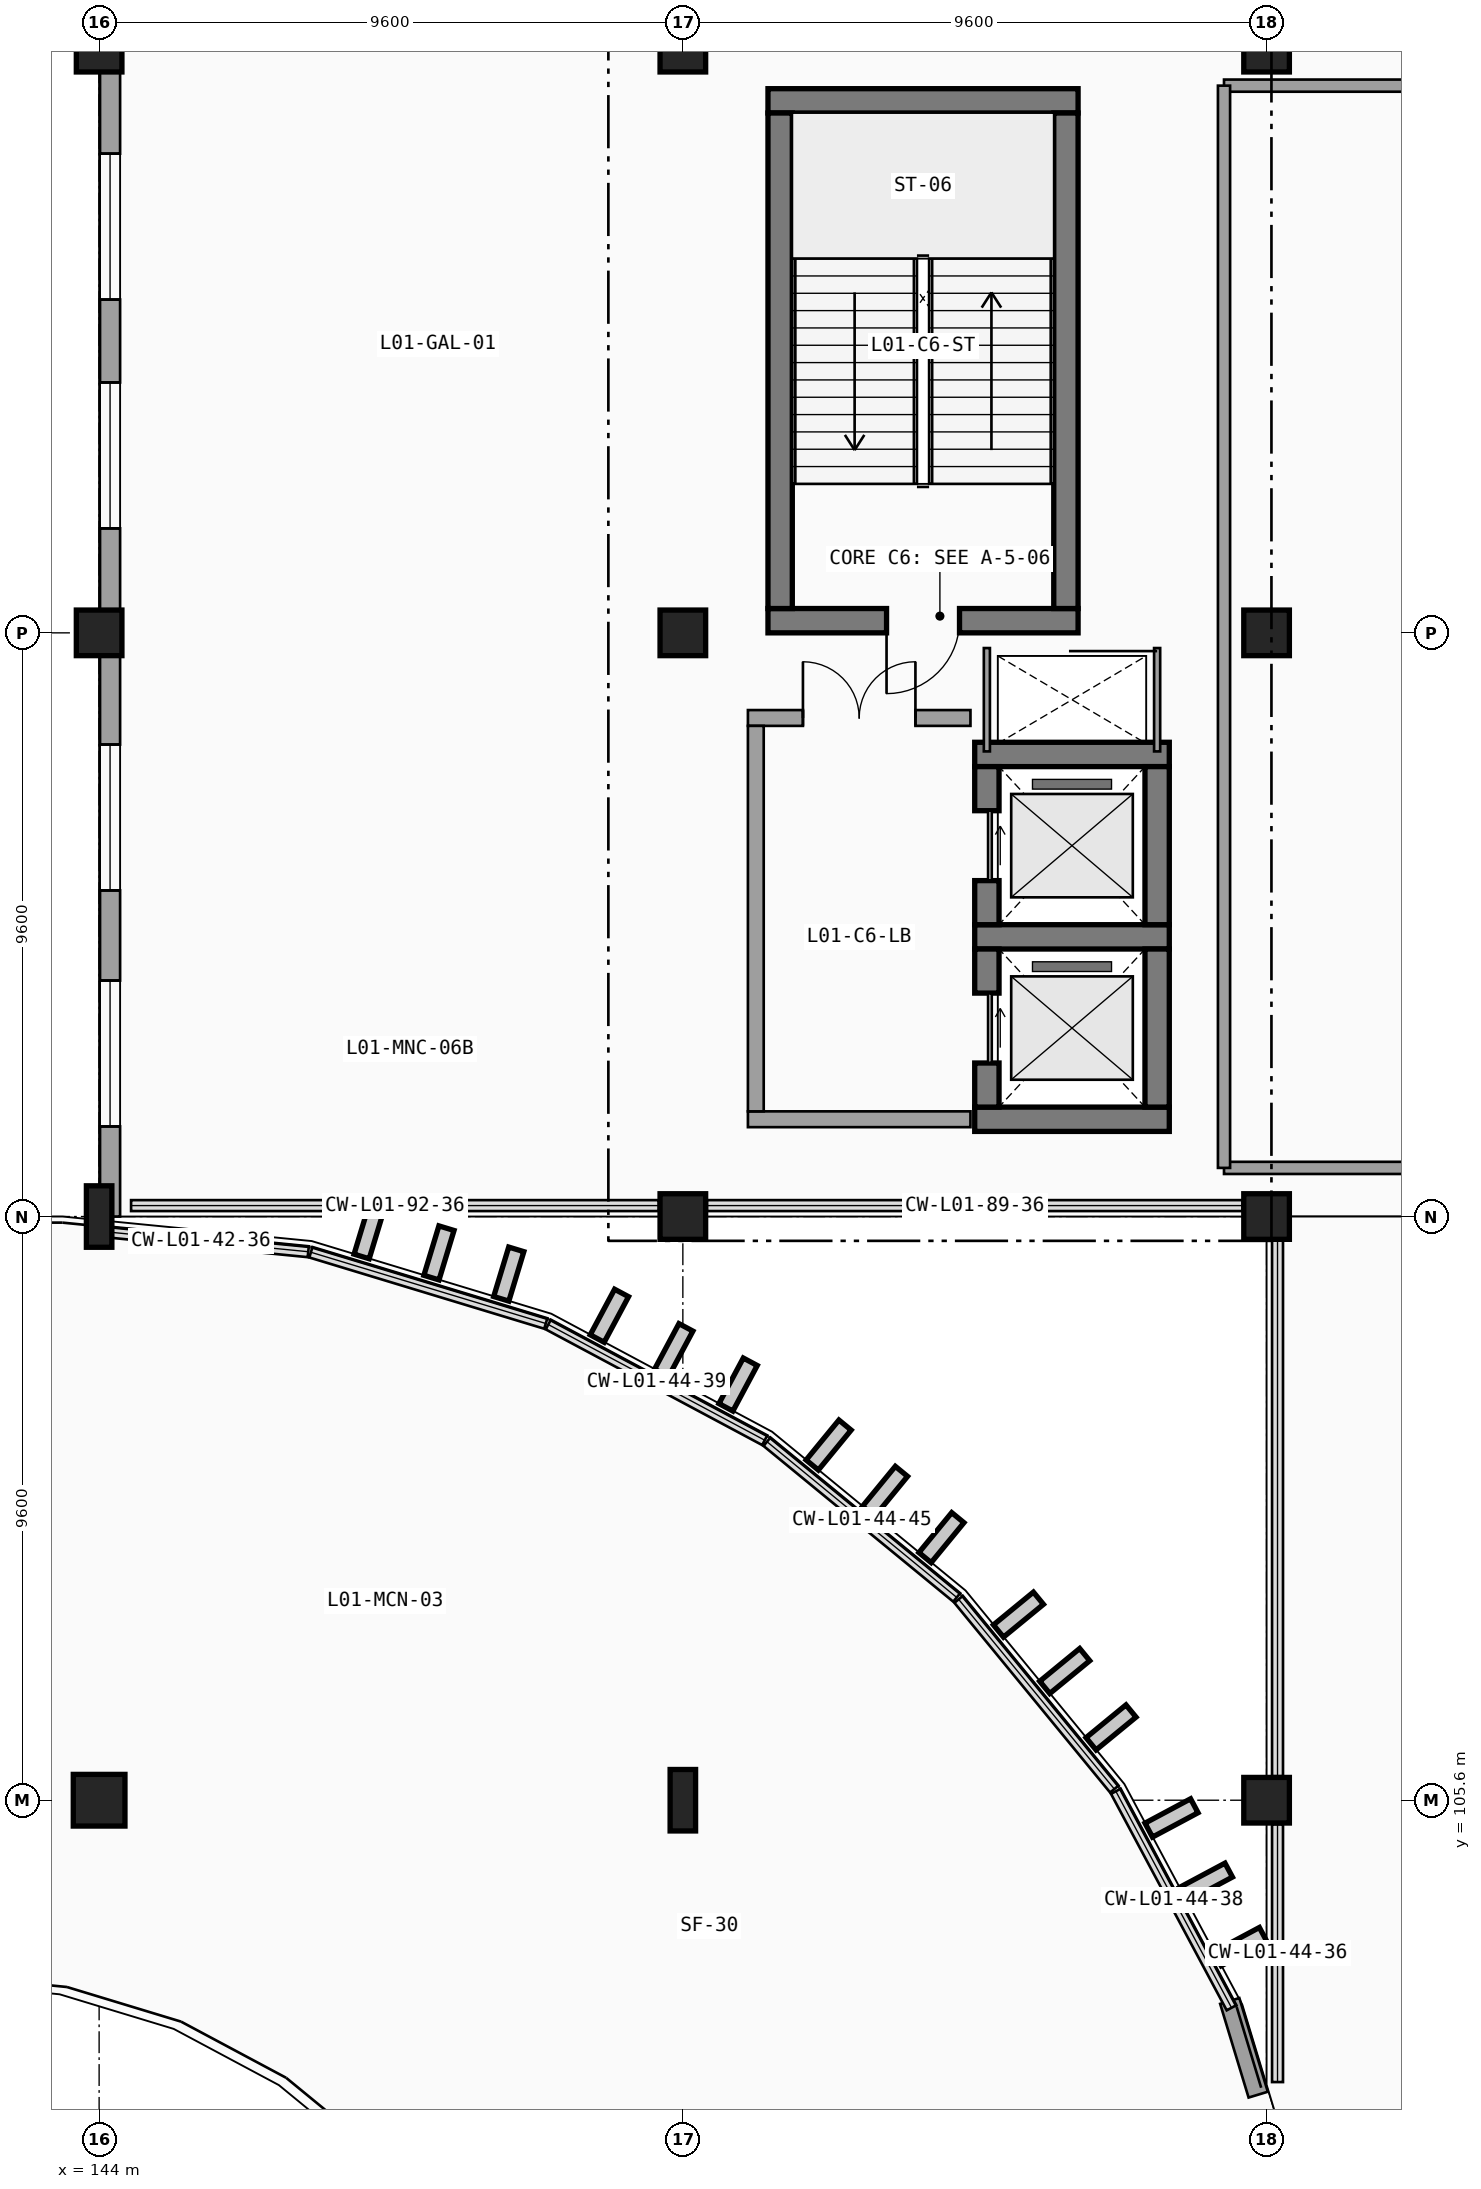
"""IFC4 building model, lengths in metres.
Left out: names, types, materials, properties, quantities, classifications, styles, units other than length and angle.
Written with IfcOpenShell. Run it as: python <this file> out.ifc"""

import sys

from ifc_helpers import new_model, si_unit, direction, frame, frame_2d, origin, origin_2d, place, context, subcontext, project, spatial, rectangle, i_section, extrude, element, fill, save


model = new_model("IFC4")
c1 = context("Model", 3, precision=1e-05, world=origin(), true_north=direction((0.0, 1.0)))
c2 = subcontext(c1, "Body", "Model", "MODEL_VIEW")
j1 = project(units=[si_unit("LENGTHUNIT", "METRE"), si_unit("PLANEANGLEUNIT", "RADIAN")], contexts=[c1])
p1 = place(None, origin())
s1 = spatial("IfcSite", under=j1, at=p1, CompositionType="ELEMENT")
p2 = place(p1, origin())
s2 = spatial("IfcBuilding", under=s1, at=p2, CompositionType="ELEMENT")
p3 = place(p2, frame((0.0, 0.0, 4.8)))
s3 = spatial("IfcBuildingStorey", under=s2, at=p3, CompositionType="ELEMENT", Elevation=4.8)
p4 = place(p3, frame((144.0, 105.6, 0.0), z_axis=(0.0, 0.0, 1.0), x_axis=(1.0, 0.0, 0.0)))
e1 = element("IfcColumn", 1, at=p4, inside=s3, PredefinedType="COLUMN", context=c2, shape_type="SweptSolid", body=[
    extrude(rectangle(XDim=0.85, YDim=0.85, at=origin_2d()), origin(), (0.0, 0.0, 1.0), 4.8),
])
p5 = place(p3, frame((144.0, 115.2, 0.0), z_axis=(0.0, 0.0, 1.0), x_axis=(1.0, 0.0, 0.0)))
e2 = element("IfcColumn", 2, at=p5, inside=s3, PredefinedType="COLUMN", context=c2, shape_type="SweptSolid", body=[
    extrude(i_section(OverallWidth=0.419, OverallDepth=1.011, WebThickness=0.024, FlangeThickness=0.042, FilletRadius=0.031, at=origin_2d()), origin(), (0.0, 0.0, 1.0), 4.8),
])
for number, where, z_axis, x_axis in (
    (3, (144.0, 124.8, 0.0), (0.0, 0.0, 1.0), (1.0, 0.0, 0.0)),
    (4, (144.0, 134.4, 0.0), (0.0, 0.0, 1.0), (1.0, 0.0, 0.0)),
):
    element("IfcColumn", number, at=place(p3, frame(where, z_axis=z_axis, x_axis=x_axis)), inside=s3, PredefinedType="COLUMN", context=c2, shape_type="SweptSolid", body=[
        extrude(rectangle(XDim=0.75, YDim=0.75, at=origin_2d()), origin(), (0.0, 0.0, 1.0), 4.8),
    ])
p6 = place(p3, frame((153.6, 105.6, 0.0), z_axis=(0.0, 0.0, 1.0), x_axis=(1.0, 0.0, 0.0)))
e5 = element("IfcColumn", 5, at=p6, inside=s3, PredefinedType="COLUMN", context=c2, shape_type="SweptSolid", body=[
    extrude(i_section(OverallWidth=0.419, OverallDepth=1.011, WebThickness=0.024, FlangeThickness=0.042, FilletRadius=0.031, at=origin_2d()), origin(), (0.0, 0.0, 1.0), 4.8),
])
for number, where, z_axis, x_axis in (
    (6, (153.6, 115.2, 0.0), (0.0, 0.0, 1.0), (1.0, 0.0, 0.0)),
    (7, (153.6, 124.8, 0.0), (0.0, 0.0, 1.0), (1.0, 0.0, 0.0)),
    (8, (153.6, 134.4, 0.0), (0.0, 0.0, 1.0), (1.0, 0.0, 0.0)),
    (9, (163.2, 105.6, 0.0), (0.0, 0.0, 1.0), (1.0, 0.0, 0.0)),
    (10, (163.2, 115.2, 0.0), (0.0, 0.0, 1.0), (1.0, 0.0, 0.0)),
    (11, (163.2, 124.8, 0.0), (0.0, 0.0, 1.0), (1.0, 0.0, 0.0)),
    (12, (163.2, 134.4, 0.0), (0.0, 0.0, 1.0), (1.0, 0.0, 0.0)),
):
    element("IfcColumn", number, at=place(p3, frame(where, z_axis=z_axis, x_axis=x_axis)), inside=s3, PredefinedType="COLUMN", context=c2, shape_type="SweptSolid", body=[
        extrude(rectangle(XDim=0.75, YDim=0.75, at=origin_2d()), origin(), (0.0, 0.0, 1.0), 4.8),
    ])
p7 = place(p3, frame((144.18, 134.045, 0.0), z_axis=(0.0, 0.0, 1.0), x_axis=(0.0, -1.0, 0.0)))
e13 = element("IfcWall", 13, at=p7, inside=s3, PredefinedType="SOLIDWALL", context=c2, shape_type="SweptSolid", body=[
    extrude(rectangle(XDim=8.89, YDim=0.33, at=frame_2d((4.445, 0.0))), origin(), (0.0, 0.0, 1.0), 3.913),
])
p8 = place(p7, frame((3.763, 0.0, 0.95), z_axis=(0.0, 0.0, 1.0), x_axis=(-1.0, 0.0, 0.0)))
e14 = element("IfcOpeningElement", 14, at=p8, cuts=e13, PredefinedType="OPENING", context=c2, shape_type="SweptSolid", body=[
    extrude(rectangle(XDim=2.4, YDim=2.2, at=frame_2d((1.2, 1.1))), frame((0.0, 0.175, 0.0), z_axis=(0.0, -1.0, 0.0), x_axis=(1.0, 0.0, 0.0)), (0.0, 0.0, 1.0), 0.35),
])
p9 = place(p7, frame((7.527, 0.0, 0.95), z_axis=(0.0, 0.0, 1.0), x_axis=(-1.0, 0.0, 0.0)))
e15 = element("IfcOpeningElement", 15, at=p9, cuts=e13, PredefinedType="OPENING", context=c2, shape_type="SweptSolid", body=[
    extrude(rectangle(XDim=2.4, YDim=2.2, at=frame_2d((1.2, 1.1))), frame((0.0, 0.175, 0.0), z_axis=(0.0, -1.0, 0.0), x_axis=(1.0, 0.0, 0.0)), (0.0, 0.0, 1.0), 0.35),
])
p10 = place(p3, frame((144.18, 124.445, 0.0), z_axis=(0.0, 0.0, 1.0), x_axis=(0.0, -1.0, 0.0)))
e16 = element("IfcWall", 16, at=p10, inside=s3, PredefinedType="SOLIDWALL", context=c2, shape_type="SweptSolid", body=[
    extrude(rectangle(XDim=9.245, YDim=0.33, at=frame_2d((4.623, 0.0))), origin(), (0.0, 0.0, 1.0), 3.593),
])
p11 = place(p10, frame((3.882, 0.0, 0.95), z_axis=(0.0, 0.0, 1.0), x_axis=(-1.0, 0.0, 0.0)))
e17 = element("IfcOpeningElement", 17, at=p11, cuts=e16, PredefinedType="OPENING", context=c2, shape_type="SweptSolid", body=[
    extrude(rectangle(XDim=2.4, YDim=2.2, at=frame_2d((1.2, 1.1))), frame((0.0, 0.175, 0.0), z_axis=(0.0, -1.0, 0.0), x_axis=(1.0, 0.0, 0.0)), (0.0, 0.0, 1.0), 0.35),
])
p12 = place(p10, frame((7.763, 0.0, 0.95), z_axis=(0.0, 0.0, 1.0), x_axis=(-1.0, 0.0, 0.0)))
e18 = element("IfcOpeningElement", 18, at=p12, cuts=e16, PredefinedType="OPENING", context=c2, shape_type="SweptSolid", body=[
    extrude(rectangle(XDim=2.4, YDim=2.2, at=frame_2d((1.2, 1.1))), frame((0.0, 0.175, 0.0), z_axis=(0.0, -1.0, 0.0), x_axis=(1.0, 0.0, 0.0)), (0.0, 0.0, 1.0), 0.35),
])
p13 = place(p3, frame((163.062, 100.757, 0.0), z_axis=(0.0, 0.0, 1.0), x_axis=(-0.290196653702, 0.956967032964, 0.0)))
e19 = element("IfcWall", 19, at=p13, inside=s3, PredefinedType="SOLIDWALL", context=c2, shape_type="SweptSolid", body=[
    extrude(rectangle(XDim=1.611, YDim=0.33, at=frame_2d((0.806, 0.0))), origin(), (0.0, 0.0, 1.0), 3.593),
])
p14 = place(p3, frame((155.0, 125.0, 0.0), z_axis=(0.0, 0.0, 1.0), x_axis=(1.0, 0.0, 0.0)))
e20 = element("IfcWall", 20, at=p14, inside=s3, PredefinedType="SHEAR", context=c2, shape_type="SweptSolid", body=[
    extrude(rectangle(XDim=5.1, YDim=0.4, at=frame_2d((2.55, 0.0))), origin(), (0.0, 0.0, 1.0), 4.52),
])
p15 = place(p14, frame((3.15, 0.0, 0.0), z_axis=(0.0, 0.0, 1.0), x_axis=(-1.0, 0.0, 0.0)))
e21 = element("IfcOpeningElement", 21, at=p15, cuts=e20, PredefinedType="OPENING", context=c2, shape_type="SweptSolid", body=[
    extrude(rectangle(XDim=1.2, YDim=2.2, at=frame_2d((0.6, 1.1))), frame((0.0, 0.21, 0.0), z_axis=(0.0, -1.0, 0.0), x_axis=(1.0, 0.0, 0.0)), (0.0, 0.0, 1.0), 0.42),
])
p16 = place(p3, frame((160.1, 133.55, 0.0), z_axis=(0.0, 0.0, 1.0), x_axis=(-1.0, 0.0, 0.0)))
e22 = element("IfcWall", 22, at=p16, inside=s3, PredefinedType="SHEAR", context=c2, shape_type="SweptSolid", body=[
    extrude(rectangle(XDim=5.1, YDim=0.4, at=frame_2d((2.55, 0.0))), origin(), (0.0, 0.0, 1.0), 4.52),
])
for number, where, z_axis, x_axis in (
    (23, (155.2, 133.35, 0.0), (0.0, 0.0, 1.0), (0.0, -1.0, 0.0)),
    (24, (159.9, 125.2, 0.0), (0.0, 0.0, 1.0), (0.0, 1.0, 0.0)),
):
    element("IfcWall", number, at=place(p3, frame(where, z_axis=z_axis, x_axis=x_axis)), inside=s3, PredefinedType="SHEAR", context=c2, shape_type="SweptSolid", body=[
        extrude(rectangle(XDim=8.15, YDim=0.4, at=frame_2d((4.075, 0.0))), origin(), (0.0, 0.0, 1.0), 4.52),
    ])
for number, where, z_axis, x_axis in (
    (25, (158.4, 116.8, 0.0), (0.0, 0.0, 1.0), (1.0, 0.0, 0.0)),
    (26, (161.6, 119.8, 0.0), (0.0, 0.0, 1.0), (-1.0, 0.0, 0.0)),
):
    element("IfcWall", number, at=place(p3, frame(where, z_axis=z_axis, x_axis=x_axis)), inside=s3, PredefinedType="SHEAR", context=c2, shape_type="SweptSolid", body=[
        extrude(rectangle(XDim=3.2, YDim=0.4, at=frame_2d((1.6, 0.0))), origin(), (0.0, 0.0, 1.0), 4.52),
    ])
p17 = place(p3, frame((158.6, 119.6, 0.0), z_axis=(0.0, 0.0, 1.0), x_axis=(0.0, -1.0, 0.0)))
e27 = element("IfcWall", 27, at=p17, inside=s3, PredefinedType="SHEAR", context=c2, shape_type="SweptSolid", body=[
    extrude(rectangle(XDim=2.6, YDim=0.4, at=frame_2d((1.3, 0.0))), origin(), (0.0, 0.0, 1.0), 4.52),
])
p18 = place(p17, frame((0.725, 0.0, 0.0), z_axis=(0.0, 0.0, 1.0), x_axis=(1.0, 0.0, 0.0)))
e28 = element("IfcOpeningElement", 28, at=p18, cuts=e27, PredefinedType="OPENING", context=c2, shape_type="SweptSolid", body=[
    extrude(rectangle(XDim=1.15, YDim=2.2, at=frame_2d((0.575, 1.1))), frame((0.0, 0.21, 0.0), z_axis=(0.0, -1.0, 0.0), x_axis=(1.0, 0.0, 0.0)), (0.0, 0.0, 1.0), 0.42),
])
p19 = place(p3, frame((161.4, 117.0, 0.0), z_axis=(0.0, 0.0, 1.0), x_axis=(0.0, 1.0, 0.0)))
e29 = element("IfcWall", 29, at=p19, inside=s3, PredefinedType="SHEAR", context=c2, shape_type="SweptSolid", body=[
    extrude(rectangle(XDim=2.6, YDim=0.4, at=frame_2d((1.3, 0.0))), origin(), (0.0, 0.0, 1.0), 4.52),
])
p20 = place(p3, frame((161.6, 122.8, 0.0), z_axis=(0.0, 0.0, 1.0), x_axis=(-1.0, 0.0, 0.0)))
e30 = element("IfcWall", 30, at=p20, inside=s3, PredefinedType="SHEAR", context=c2, shape_type="SweptSolid", body=[
    extrude(rectangle(XDim=3.2, YDim=0.4, at=frame_2d((1.6, 0.0))), origin(), (0.0, 0.0, 1.0), 4.52),
])
p21 = place(p3, frame((158.6, 122.6, 0.0), z_axis=(0.0, 0.0, 1.0), x_axis=(0.0, -1.0, 0.0)))
e31 = element("IfcWall", 31, at=p21, inside=s3, PredefinedType="SHEAR", context=c2, shape_type="SweptSolid", body=[
    extrude(rectangle(XDim=2.6, YDim=0.4, at=frame_2d((1.3, 0.0))), origin(), (0.0, 0.0, 1.0), 4.52),
])
p22 = place(p21, frame((0.725, 0.0, 0.0), z_axis=(0.0, 0.0, 1.0), x_axis=(1.0, 0.0, 0.0)))
e32 = element("IfcOpeningElement", 32, at=p22, cuts=e31, PredefinedType="OPENING", context=c2, shape_type="SweptSolid", body=[
    extrude(rectangle(XDim=1.15, YDim=2.2, at=frame_2d((0.575, 1.1))), frame((0.0, 0.21, 0.0), z_axis=(0.0, -1.0, 0.0), x_axis=(1.0, 0.0, 0.0)), (0.0, 0.0, 1.0), 0.42),
])
p23 = place(p3, frame((161.4, 120.0, 0.0), z_axis=(0.0, 0.0, 1.0), x_axis=(0.0, 1.0, 0.0)))
e33 = element("IfcWall", 33, at=p23, inside=s3, PredefinedType="SHEAR", context=c2, shape_type="SweptSolid", body=[
    extrude(rectangle(XDim=2.6, YDim=0.4, at=frame_2d((1.3, 0.0))), origin(), (0.0, 0.0, 1.0), 4.52),
])
for number, where, z_axis, x_axis in (
    (34, (158.6, 124.55, 0.0), (0.0, 0.0, 1.0), (0.0, -1.0, 0.0)),
    (35, (161.4, 122.85, 0.0), (0.0, 0.0, 1.0), (0.0, 1.0, 0.0)),
):
    element("IfcWall", number, at=place(p3, frame(where, z_axis=z_axis, x_axis=x_axis)), inside=s3, PredefinedType="PARTITIONING", context=c2, shape_type="SweptSolid", body=[
        extrude(rectangle(XDim=1.7, YDim=0.1, at=frame_2d((0.85, 0.0))), origin(), (0.0, 0.0, 1.0), 4.52),
    ])
p24 = place(p3, frame((154.67, 116.8, 0.0), z_axis=(0.0, 0.0, 1.0), x_axis=(1.0, 0.0, 0.0)))
e36 = element("IfcWall", 36, at=p24, inside=s3, PredefinedType="SOLIDWALL", context=c2, shape_type="SweptSolid", body=[
    extrude(rectangle(XDim=3.66, YDim=0.26, at=frame_2d((1.83, 0.0))), origin(), (0.0, 0.0, 1.0), 4.52),
])
p25 = place(p3, frame((158.33, 123.4, 0.0), z_axis=(0.0, 0.0, 1.0), x_axis=(-1.0, 0.0, 0.0)))
e37 = element("IfcWall", 37, at=p25, inside=s3, PredefinedType="SOLIDWALL", context=c2, shape_type="SweptSolid", body=[
    extrude(rectangle(XDim=3.66, YDim=0.26, at=frame_2d((1.83, 0.0))), origin(), (0.0, 0.0, 1.0), 4.52),
])
p26 = place(p25, frame((2.755, 0.0, 0.0), z_axis=(0.0, 0.0, 1.0), x_axis=(-1.0, 0.0, 0.0)))
e38 = element("IfcOpeningElement", 38, at=p26, cuts=e37, PredefinedType="OPENING", context=c2, shape_type="SweptSolid", body=[
    extrude(rectangle(XDim=1.85, YDim=2.25, at=frame_2d((0.925, 1.125))), frame((0.0, 0.14, 0.0), z_axis=(0.0, -1.0, 0.0), x_axis=(1.0, 0.0, 0.0)), (0.0, 0.0, 1.0), 0.28),
])
p27 = place(p3, frame((154.8, 123.27, 0.0), z_axis=(0.0, 0.0, 1.0), x_axis=(0.0, -1.0, 0.0)))
e39 = element("IfcWall", 39, at=p27, inside=s3, PredefinedType="SOLIDWALL", context=c2, shape_type="SweptSolid", body=[
    extrude(rectangle(XDim=6.34, YDim=0.26, at=frame_2d((3.17, 0.0))), origin(), (0.0, 0.0, 1.0), 4.52),
])
p28 = place(p3, frame((162.5, 133.8, 0.0), z_axis=(0.0, 0.0, 1.0), x_axis=(1.0, 0.0, 0.0)))
e40 = element("IfcWall", 40, at=p28, inside=s3, PredefinedType="PARTITIONING", context=c2, shape_type="SweptSolid", body=[
    extrude(rectangle(XDim=29.0, YDim=0.2, at=frame_2d((14.5, 0.0))), origin(), (0.0, 0.0, 1.0), 3.77),
])
p29 = place(p3, frame((191.5, 116.0, 0.0), z_axis=(0.0, 0.0, 1.0), x_axis=(-1.0, 0.0, 0.0)))
e41 = element("IfcWall", 41, at=p29, inside=s3, PredefinedType="PARTITIONING", context=c2, shape_type="SweptSolid", body=[
    extrude(rectangle(XDim=29.0, YDim=0.2, at=frame_2d((14.5, 0.0))), origin(), (0.0, 0.0, 1.0), 3.593),
])
p30 = place(p29, frame((3.55, 0.0, 0.0), z_axis=(0.0, 0.0, 1.0), x_axis=(1.0, 0.0, 0.0)))
e42 = element("IfcOpeningElement", 42, at=p30, cuts=e41, PredefinedType="OPENING", context=c2, shape_type="SweptSolid", body=[
    extrude(rectangle(XDim=1.5, YDim=2.25, at=frame_2d((0.75, 1.125))), frame((0.0, 0.11, 0.0), z_axis=(0.0, -1.0, 0.0), x_axis=(1.0, 0.0, 0.0)), (0.0, 0.0, 1.0), 0.22),
])
p31 = place(p3, frame((162.5, 116.0, 0.0), z_axis=(0.0, 0.0, 1.0), x_axis=(0.0, 1.0, 0.0)))
e43 = element("IfcWall", 43, at=p31, inside=s3, PredefinedType="PARTITIONING", context=c2, shape_type="SweptSolid", body=[
    extrude(rectangle(XDim=17.8, YDim=0.2, at=frame_2d((8.9, 0.0))), origin(), (0.0, 0.0, 1.0), 3.758),
])
p32 = place(p8, origin())
e44 = element("IfcWindow", 44, at=p32, inside=s3, PartitioningType="SINGLE_PANEL", PredefinedType="WINDOW", context=c2, shape_type="SweptSolid", body=[
    extrude(rectangle(XDim=2.4, YDim=2.2, at=frame_2d((1.2, 1.1))), frame((0.0, 0.03, 0.0), z_axis=(0.0, -1.0, 0.0), x_axis=(1.0, 0.0, 0.0)), (0.0, 0.0, 1.0), 0.06),
])
fill(e14, e44)
p33 = place(p9, origin())
e45 = element("IfcWindow", 45, at=p33, inside=s3, PartitioningType="SINGLE_PANEL", PredefinedType="WINDOW", context=c2, shape_type="SweptSolid", body=[
    extrude(rectangle(XDim=2.4, YDim=2.2, at=frame_2d((1.2, 1.1))), frame((0.0, 0.03, 0.0), z_axis=(0.0, -1.0, 0.0), x_axis=(1.0, 0.0, 0.0)), (0.0, 0.0, 1.0), 0.06),
])
fill(e15, e45)
p34 = place(p11, origin())
e46 = element("IfcWindow", 46, at=p34, inside=s3, PartitioningType="SINGLE_PANEL", PredefinedType="WINDOW", context=c2, shape_type="SweptSolid", body=[
    extrude(rectangle(XDim=2.4, YDim=2.2, at=frame_2d((1.2, 1.1))), frame((0.0, 0.03, 0.0), z_axis=(0.0, -1.0, 0.0), x_axis=(1.0, 0.0, 0.0)), (0.0, 0.0, 1.0), 0.06),
])
fill(e17, e46)
p35 = place(p12, origin())
e47 = element("IfcWindow", 47, at=p35, inside=s3, PartitioningType="SINGLE_PANEL", PredefinedType="WINDOW", context=c2, shape_type="SweptSolid", body=[
    extrude(rectangle(XDim=2.4, YDim=2.2, at=frame_2d((1.2, 1.1))), frame((0.0, 0.03, 0.0), z_axis=(0.0, -1.0, 0.0), x_axis=(1.0, 0.0, 0.0)), (0.0, 0.0, 1.0), 0.06),
])
fill(e18, e47)
p36 = place(p15, origin())
e48 = element("IfcDoor", 48, at=p36, inside=s3, OperationType="SINGLE_SWING_RIGHT", PredefinedType="DOOR", context=c2, shape_type="SweptSolid", body=[
    extrude(rectangle(XDim=1.2, YDim=2.2, at=frame_2d((0.6, 1.1))), frame((0.0, 0.025, 0.0), z_axis=(0.0, -1.0, 0.0), x_axis=(1.0, 0.0, 0.0)), (0.0, 0.0, 1.0), 0.05),
])
fill(e21, e48)
p37 = place(p18, origin())
e49 = element("IfcDoor", 49, at=p37, inside=s3, OperationType="SLIDING_TO_LEFT", PredefinedType="DOOR", context=c2, shape_type="SweptSolid", body=[
    extrude(rectangle(XDim=1.15, YDim=2.2, at=frame_2d((0.575, 1.1))), frame((0.0, 0.025, 0.0), z_axis=(0.0, -1.0, 0.0), x_axis=(1.0, 0.0, 0.0)), (0.0, 0.0, 1.0), 0.05),
])
fill(e28, e49)
p38 = place(p22, origin())
e50 = element("IfcDoor", 50, at=p38, inside=s3, OperationType="SLIDING_TO_LEFT", PredefinedType="DOOR", context=c2, shape_type="SweptSolid", body=[
    extrude(rectangle(XDim=1.15, YDim=2.2, at=frame_2d((0.575, 1.1))), frame((0.0, 0.025, 0.0), z_axis=(0.0, -1.0, 0.0), x_axis=(1.0, 0.0, 0.0)), (0.0, 0.0, 1.0), 0.05),
])
fill(e32, e50)
p39 = place(p26, origin())
e51 = element("IfcDoor", 51, at=p39, inside=s3, OperationType="DOUBLE_DOOR_SINGLE_SWING", PredefinedType="DOOR", context=c2, shape_type="SweptSolid", body=[
    extrude(rectangle(XDim=1.85, YDim=2.25, at=frame_2d((0.925, 1.125))), frame((0.0, 0.025, 0.0), z_axis=(0.0, -1.0, 0.0), x_axis=(1.0, 0.0, 0.0)), (0.0, 0.0, 1.0), 0.05),
])
fill(e38, e51)
save(model, sys.argv[1])
